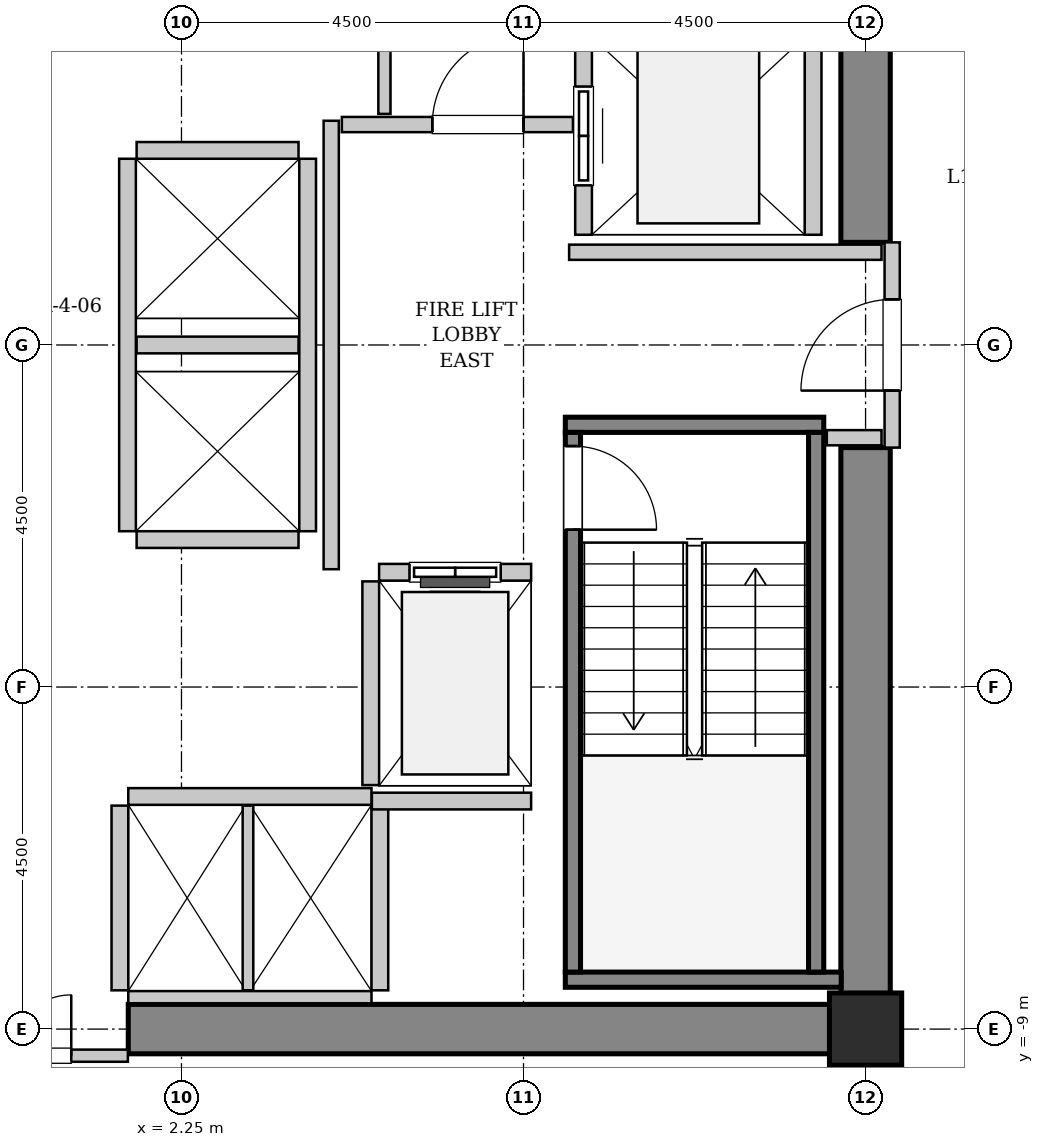
"""IFC4 building model, lengths in metres.
Left out: names, types, materials, properties, quantities, classifications, styles, units other than length and angle.
Written with IfcOpenShell. Run it as: python <this file> out.ifc"""

import sys

from ifc_helpers import new_model, si_unit, direction, frame, frame_2d, origin, origin_2d, place, context, subcontext, project, spatial, rectangle, hollow_rectangle, extrude, source, transform, mapped, element, fill, save


model = new_model("IFC4")
c1 = context("Model", 3, precision=1e-05, world=origin(), true_north=direction((0.0, 1.0)))
c2 = subcontext(c1, "Body", "Model", "MODEL_VIEW")
j1 = project(units=[si_unit("LENGTHUNIT", "METRE"), si_unit("PLANEANGLEUNIT", "RADIAN")], contexts=[c1])
p1 = place(None, origin())
s1 = spatial("IfcSite", under=j1, at=p1, CompositionType="ELEMENT")
p2 = place(p1, origin())
s2 = spatial("IfcBuilding", under=s1, at=p2, CompositionType="ELEMENT")
p3 = place(p2, frame((0.0, 0.0, 82.4)))
s3 = spatial("IfcBuildingStorey", under=s2, at=p3, CompositionType="ELEMENT", Elevation=82.4)
m1 = source(origin(), c2, "Body", "SweptSolid", [
    extrude(rectangle(XDim=10.025, YDim=0.65, at=frame_2d((5.012, 0.0))), origin(), (0.0, 0.0, 1.0), 3.8),
])
p4 = place(p3, frame((1.55, -9.0, 0.0), z_axis=(0.0, 0.0, 1.0), x_axis=(1.0, 0.0, 0.0)))
e1 = element("IfcWall", 1, at=p4, inside=s3, PredefinedType="SHEAR", context=c2, shape_type="MappedRepresentation", body=[
    mapped(m1, transform((0.0, 0.0, 0.0), x_axis=(1.0, 0.0, 0.0), y_axis=(0.0, 1.0, 0.0), z_axis=(0.0, 0.0, 1.0), scale=1.0)),
])
m2 = source(origin(), c2, "Body", "SweptSolid", [
    extrude(rectangle(XDim=7.325, YDim=0.65, at=frame_2d((3.663, 0.0))), origin(), (0.0, 0.0, 1.0), 3.8),
])
for number, where, z_axis, x_axis in (
    (2, (11.25, -8.675, 0.0), (0.0, 0.0, 1.0), (0.0, 1.0, 0.0)),
    (3, (11.25, 1.35, 0.0), (0.0, 0.0, 1.0), (0.0, 1.0, 0.0)),
):
    element("IfcWall", number, at=place(p3, frame(where, z_axis=z_axis, x_axis=x_axis)), inside=s3, PredefinedType="SHEAR", context=c2, shape_type="MappedRepresentation", body=[
        mapped(m2, transform((0.0, 0.0, 0.0), x_axis=(1.0, 0.0, 0.0), y_axis=(0.0, 1.0, 0.0), z_axis=(0.0, 0.0, 1.0), scale=1.0)),
    ])
m3 = source(origin(), c2, "Body", "SweptSolid", [
    extrude(hollow_rectangle(XDim=0.95, YDim=0.95, WallThickness=0.045, InnerFilletRadius=0.045, OuterFilletRadius=0.09, at=origin_2d()), origin(), (0.0, 0.0, 1.0), 3.8),
])
p5 = place(p3, frame((11.25, -9.0, 0.0), z_axis=(0.0, 0.0, 1.0), x_axis=(1.0, 0.0, 0.0)))
e4 = element("IfcColumn", 4, at=p5, inside=s3, PredefinedType="COLUMN", context=c2, shape_type="MappedRepresentation", body=[
    mapped(m3, transform((0.0, 0.0, 0.0), x_axis=(1.0, 0.0, 0.0), y_axis=(0.0, 1.0, 0.0), z_axis=(0.0, 0.0, 1.0), scale=1.0)),
])
m4 = source(origin(), c2, "Body", "SweptSolid", [
    extrude(rectangle(XDim=3.4, YDim=0.2, at=frame_2d((1.7, 0.0))), origin(), (0.0, 0.0, 1.0), 3.8),
])
p6 = place(p3, frame((7.3, -1.05, 0.0), z_axis=(0.0, 0.0, 1.0), x_axis=(1.0, 0.0, 0.0)))
e5 = element("IfcWall", 5, at=p6, inside=s3, PredefinedType="SOLIDWALL", context=c2, shape_type="MappedRepresentation", body=[
    mapped(m4, transform((0.0, 0.0, 0.0), x_axis=(1.0, 0.0, 0.0), y_axis=(0.0, 1.0, 0.0), z_axis=(0.0, 0.0, 1.0), scale=1.0)),
])
m5 = source(origin(), c2, "Body", "SweptSolid", [
    extrude(rectangle(XDim=3.63, YDim=0.2, at=frame_2d((1.815, 0.0))), origin(), (0.0, 0.0, 1.0), 3.8),
])
p7 = place(p3, frame((7.3, -8.35, 0.0), z_axis=(0.0, 0.0, 1.0), x_axis=(1.0, 0.0, 0.0)))
e6 = element("IfcWall", 6, at=p7, inside=s3, PredefinedType="SOLIDWALL", context=c2, shape_type="MappedRepresentation", body=[
    mapped(m5, transform((0.0, 0.0, 0.0), x_axis=(1.0, 0.0, 0.0), y_axis=(0.0, 1.0, 0.0), z_axis=(0.0, 0.0, 1.0), scale=1.0)),
])
m6 = source(origin(), c2, "Body", "SweptSolid", [
    extrude(rectangle(XDim=7.1, YDim=0.2, at=frame_2d((3.55, 0.0))), origin(), (0.0, 0.0, 1.0), 3.8),
])
p8 = place(p3, frame((7.4, -1.15, 0.0), z_axis=(0.0, 0.0, 1.0), x_axis=(0.0, -1.0, 0.0)))
e7 = element("IfcWall", 7, at=p8, inside=s3, PredefinedType="SOLIDWALL", context=c2, shape_type="MappedRepresentation", body=[
    mapped(m6, transform((0.0, 0.0, 0.0), x_axis=(1.0, 0.0, 0.0), y_axis=(0.0, 1.0, 0.0), z_axis=(0.0, 0.0, 1.0), scale=1.0)),
])
p9 = place(p8, frame((0.18, 0.0, 0.0)))
e8 = element("IfcOpeningElement", 8, at=p9, cuts=e7, PredefinedType="OPENING", context=c2, shape_type="SweptSolid", body=[
    extrude(rectangle(XDim=1.1, YDim=2.15, at=frame_2d((0.55, 1.075))), frame((0.0, 0.11, 0.0), z_axis=(0.0, -1.0, 0.0), x_axis=(1.0, 0.0, 0.0)), (0.0, 0.0, 1.0), 0.22),
])
p10 = place(p3, frame((10.6, -1.15, 0.0), z_axis=(0.0, 0.0, 1.0), x_axis=(0.0, -1.0, 0.0)))
e9 = element("IfcWall", 9, at=p10, inside=s3, PredefinedType="SOLIDWALL", context=c2, shape_type="MappedRepresentation", body=[
    mapped(m6, transform((0.0, 0.0, 0.0), x_axis=(1.0, 0.0, 0.0), y_axis=(0.0, 1.0, 0.0), z_axis=(0.0, 0.0, 1.0), scale=1.0)),
])
m7 = source(origin(), c2, "Body", "SweptSolid", [
    extrude(rectangle(XDim=2.0, YDim=0.22, at=frame_2d((1.0, 0.0))), origin(), (0.0, 0.0, 1.0), 3.485),
])
p11 = place(p3, frame((6.85, -2.99, 0.0), z_axis=(0.0, 0.0, 1.0), x_axis=(-1.0, 0.0, 0.0)))
e10 = element("IfcWall", 10, at=p11, inside=s3, PredefinedType="SOLIDWALL", context=c2, shape_type="MappedRepresentation", body=[
    mapped(m7, transform((0.0, 0.0, 0.0), x_axis=(1.0, 0.0, 0.0), y_axis=(0.0, 1.0, 0.0), z_axis=(0.0, 0.0, 1.0), scale=1.0)),
])
p12 = place(p11, frame((0.4, 0.0, 0.0)))
e11 = element("IfcOpeningElement", 11, at=p12, cuts=e10, PredefinedType="OPENING", context=c2, shape_type="SweptSolid", body=[
    extrude(rectangle(XDim=1.2, YDim=2.2, at=frame_2d((0.6, 1.1))), frame((0.0, 0.12, 0.0), z_axis=(0.0, -1.0, 0.0), x_axis=(1.0, 0.0, 0.0)), (0.0, 0.0, 1.0), 0.24),
])
m8 = source(origin(), c2, "Body", "SweptSolid", [
    extrude(rectangle(XDim=2.68, YDim=0.22, at=frame_2d((1.34, 0.0))), origin(), (0.0, 0.0, 1.0), 3.485),
])
p13 = place(p3, frame((4.74, -3.11, 0.0), z_axis=(0.0, 0.0, 1.0), x_axis=(0.0, -1.0, 0.0)))
e12 = element("IfcWall", 12, at=p13, inside=s3, PredefinedType="SOLIDWALL", context=c2, shape_type="MappedRepresentation", body=[
    mapped(m8, transform((0.0, 0.0, 0.0), x_axis=(1.0, 0.0, 0.0), y_axis=(0.0, 1.0, 0.0), z_axis=(0.0, 0.0, 1.0), scale=1.0)),
])
m9 = source(origin(), c2, "Body", "SweptSolid", [
    extrude(rectangle(XDim=5.45, YDim=0.22, at=frame_2d((2.725, 0.0))), origin(), (0.0, 0.0, 1.0), 3.485),
])
p14 = place(p3, frame((7.54, 6.9, 0.0), z_axis=(0.0, 0.0, 1.0), x_axis=(0.0, -1.0, 0.0)))
e13 = element("IfcWall", 13, at=p14, inside=s3, PredefinedType="SOLIDWALL", context=c2, shape_type="MappedRepresentation", body=[
    mapped(m9, transform((0.0, 0.0, 0.0), x_axis=(1.0, 0.0, 0.0), y_axis=(0.0, 1.0, 0.0), z_axis=(0.0, 0.0, 1.0), scale=1.0)),
])
p15 = place(p14, frame((3.5, 0.0, 0.0)))
e14 = element("IfcOpeningElement", 14, at=p15, cuts=e13, PredefinedType="OPENING", context=c2, shape_type="SweptSolid", body=[
    extrude(rectangle(XDim=1.3, YDim=2.3, at=frame_2d((0.65, 1.15))), frame((0.0, 0.12, 0.0), z_axis=(0.0, -1.0, 0.0), x_axis=(1.0, 0.0, 0.0)), (0.0, 0.0, 1.0), 0.24),
])
p16 = place(p14, frame((0.65, 0.0, 0.0)))
e15 = element("IfcOpeningElement", 15, at=p16, cuts=e13, PredefinedType="OPENING", context=c2, shape_type="SweptSolid", body=[
    extrude(rectangle(XDim=1.3, YDim=2.3, at=frame_2d((0.65, 1.15))), frame((0.0, 0.12, 0.0), z_axis=(0.0, -1.0, 0.0), x_axis=(1.0, 0.0, 0.0)), (0.0, 0.0, 1.0), 0.24),
])
p17 = place(p3, frame((10.56, 1.45, 0.0), z_axis=(0.0, 0.0, 1.0), x_axis=(0.0, 1.0, 0.0)))
e16 = element("IfcWall", 16, at=p17, inside=s3, PredefinedType="SOLIDWALL", context=c2, shape_type="MappedRepresentation", body=[
    mapped(m9, transform((0.0, 0.0, 0.0), x_axis=(1.0, 0.0, 0.0), y_axis=(0.0, 1.0, 0.0), z_axis=(0.0, 0.0, 1.0), scale=1.0)),
])
m10 = source(origin(), c2, "Body", "SweptSolid", [
    extrude(rectangle(XDim=3.2, YDim=0.22, at=frame_2d((1.6, 0.0))), origin(), (0.0, 0.0, 1.0), 3.485),
])
p18 = place(p3, frame((4.75, -5.94, 0.0), z_axis=(0.0, 0.0, 1.0), x_axis=(-1.0, 0.0, 0.0)))
e17 = element("IfcWall", 17, at=p18, inside=s3, PredefinedType="SOLIDWALL", context=c2, shape_type="MappedRepresentation", body=[
    mapped(m10, transform((0.0, 0.0, 0.0), x_axis=(1.0, 0.0, 0.0), y_axis=(0.0, 1.0, 0.0), z_axis=(0.0, 0.0, 1.0), scale=1.0)),
])
m11 = source(origin(), c2, "Body", "SweptSolid", [
    extrude(rectangle(XDim=3.2, YDim=0.16, at=frame_2d((1.6, 0.0))), origin(), (0.0, 0.0, 1.0), 2.375),
])
p19 = place(p3, frame((1.55, -8.58, 0.0), z_axis=(0.0, 0.0, 1.0), x_axis=(1.0, 0.0, 0.0)))
e18 = element("IfcWall", 18, at=p19, inside=s3, PredefinedType="PARTITIONING", context=c2, shape_type="MappedRepresentation", body=[
    mapped(m11, transform((0.0, 0.0, 0.0), x_axis=(1.0, 0.0, 0.0), y_axis=(0.0, 1.0, 0.0), z_axis=(0.0, 0.0, 1.0), scale=1.0)),
])
m12 = source(origin(), c2, "Body", "SweptSolid", [
    extrude(rectangle(XDim=2.43, YDim=0.22, at=frame_2d((1.215, 0.0))), origin(), (0.0, 0.0, 1.0), 3.485),
])
p20 = place(p3, frame((1.44, -6.06, 0.0), z_axis=(0.0, 0.0, 1.0), x_axis=(0.0, -1.0, 0.0)))
e19 = element("IfcWall", 19, at=p20, inside=s3, PredefinedType="SOLIDWALL", context=c2, shape_type="MappedRepresentation", body=[
    mapped(m12, transform((0.0, 0.0, 0.0), x_axis=(1.0, 0.0, 0.0), y_axis=(0.0, 1.0, 0.0), z_axis=(0.0, 0.0, 1.0), scale=1.0)),
])
m13 = source(origin(), c2, "Body", "SweptSolid", [
    extrude(rectangle(XDim=2.43, YDim=0.14, at=frame_2d((1.215, 0.0))), origin(), (0.0, 0.0, 1.0), 3.485),
])
p21 = place(p3, frame((3.125, -8.49, 0.0), z_axis=(0.0, 0.0, 1.0), x_axis=(0.0, 1.0, 0.0)))
e20 = element("IfcWall", 20, at=p21, inside=s3, PredefinedType="PARTITIONING", context=c2, shape_type="MappedRepresentation", body=[
    mapped(m13, transform((0.0, 0.0, 0.0), x_axis=(1.0, 0.0, 0.0), y_axis=(0.0, 1.0, 0.0), z_axis=(0.0, 0.0, 1.0), scale=1.0)),
])
p22 = place(p3, frame((4.86, -8.49, 0.0), z_axis=(0.0, 0.0, 1.0), x_axis=(0.0, 1.0, 0.0)))
e21 = element("IfcWall", 21, at=p22, inside=s3, PredefinedType="SOLIDWALL", context=c2, shape_type="MappedRepresentation", body=[
    mapped(m12, transform((0.0, 0.0, 0.0), x_axis=(1.0, 0.0, 0.0), y_axis=(0.0, 1.0, 0.0), z_axis=(0.0, 0.0, 1.0), scale=1.0)),
])
m14 = source(origin(), c2, "Body", "SweptSolid", [
    extrude(rectangle(XDim=4.9, YDim=0.22, at=frame_2d((2.45, 0.0))), origin(), (0.0, 0.0, 1.0), 3.485),
])
for number, where, z_axis, x_axis in (
    (22, (1.54, 2.45, 0.0), (0.0, 0.0, 1.0), (0.0, -1.0, 0.0)),
    (23, (3.91, -2.45, 0.0), (0.0, 0.0, 1.0), (0.0, 1.0, 0.0)),
):
    element("IfcWall", number, at=place(p3, frame(where, z_axis=z_axis, x_axis=x_axis)), inside=s3, PredefinedType="SOLIDWALL", context=c2, shape_type="MappedRepresentation", body=[
        mapped(m14, transform((0.0, 0.0, 0.0), x_axis=(1.0, 0.0, 0.0), y_axis=(0.0, 1.0, 0.0), z_axis=(0.0, 0.0, 1.0), scale=1.0)),
    ])
m15 = source(origin(), c2, "Body", "SweptSolid", [
    extrude(rectangle(XDim=2.13, YDim=0.22, at=frame_2d((1.065, 0.0))), origin(), (0.0, 0.0, 1.0), 3.485),
])
for number, where, z_axis, x_axis in (
    (24, (1.66, -2.56, 0.0), (0.0, 0.0, 1.0), (1.0, 0.0, 0.0)),
    (25, (1.66, 0.0, 0.0), (0.0, 0.0, 1.0), (1.0, 0.0, 0.0)),
    (26, (3.79, 2.56, 0.0), (0.0, 0.0, 1.0), (-1.0, 0.0, 0.0)),
):
    element("IfcWall", number, at=place(p3, frame(where, z_axis=z_axis, x_axis=x_axis)), inside=s3, PredefinedType="SOLIDWALL", context=c2, shape_type="MappedRepresentation", body=[
        mapped(m15, transform((0.0, 0.0, 0.0), x_axis=(1.0, 0.0, 0.0), y_axis=(0.0, 1.0, 0.0), z_axis=(0.0, 0.0, 1.0), scale=1.0)),
    ])
m16 = source(origin(), c2, "Body", "SweptSolid", [
    extrude(rectangle(XDim=2.095, YDim=0.22, at=frame_2d((1.048, 0.0))), origin(), (0.0, 0.0, 1.0), 3.485),
])
p23 = place(p3, frame((4.755, -6.0, 0.0), z_axis=(0.0, 0.0, 1.0), x_axis=(1.0, 0.0, 0.0)))
e27 = element("IfcWall", 27, at=p23, inside=s3, PredefinedType="SOLIDWALL", context=c2, shape_type="MappedRepresentation", body=[
    mapped(m16, transform((0.0, 0.0, 0.0), x_axis=(1.0, 0.0, 0.0), y_axis=(0.0, 1.0, 0.0), z_axis=(0.0, 0.0, 1.0), scale=1.0)),
])
m17 = source(origin(), c2, "Body", "SweptSolid", [
    extrude(rectangle(XDim=2.7, YDim=0.2, at=frame_2d((1.35, 0.0))), origin(), (0.0, 0.0, 1.0), 2.375),
])
p24 = place(p3, frame((11.6, -1.35, 0.0), z_axis=(0.0, 0.0, 1.0), x_axis=(0.0, 1.0, 0.0)))
e28 = element("IfcWall", 28, at=p24, inside=s3, PredefinedType="PARTITIONING", context=c2, shape_type="MappedRepresentation", body=[
    mapped(m17, transform((0.0, 0.0, 0.0), x_axis=(1.0, 0.0, 0.0), y_axis=(0.0, 1.0, 0.0), z_axis=(0.0, 0.0, 1.0), scale=1.0)),
])
p25 = place(p24, frame((0.75, 0.0, 0.0)))
e29 = element("IfcOpeningElement", 29, at=p25, cuts=e28, PredefinedType="OPENING", context=c2, shape_type="SweptSolid", body=[
    extrude(rectangle(XDim=1.2, YDim=2.15, at=frame_2d((0.6, 1.075))), frame((0.0, 0.11, 0.0), z_axis=(0.0, -1.0, 0.0), x_axis=(1.0, 0.0, 0.0)), (0.0, 0.0, 1.0), 0.22),
])
m18 = source(origin(), c2, "Body", "SweptSolid", [
    extrude(rectangle(XDim=5.9, YDim=0.2, at=frame_2d((2.95, 0.0))), origin(), (0.0, 0.0, 1.0), 3.485),
])
p26 = place(p3, frame((4.22, -2.95, 0.0), z_axis=(0.0, 0.0, 1.0), x_axis=(0.0, 1.0, 0.0)))
e30 = element("IfcWall", 30, at=p26, inside=s3, PredefinedType="PARTITIONING", context=c2, shape_type="MappedRepresentation", body=[
    mapped(m18, transform((0.0, 0.0, 0.0), x_axis=(1.0, 0.0, 0.0), y_axis=(0.0, 1.0, 0.0), z_axis=(0.0, 0.0, 1.0), scale=1.0)),
])
m19 = source(origin(), c2, "Body", "SweptSolid", [
    extrude(rectangle(XDim=3.04, YDim=0.2, at=frame_2d((1.52, 0.0))), origin(), (0.0, 0.0, 1.0), 3.485),
])
p27 = place(p3, frame((4.36, 2.9, 0.0), z_axis=(0.0, 0.0, 1.0), x_axis=(1.0, 0.0, 0.0)))
e31 = element("IfcWall", 31, at=p27, inside=s3, PredefinedType="PARTITIONING", context=c2, shape_type="MappedRepresentation", body=[
    mapped(m19, transform((0.0, 0.0, 0.0), x_axis=(1.0, 0.0, 0.0), y_axis=(0.0, 1.0, 0.0), z_axis=(0.0, 0.0, 1.0), scale=1.0)),
])
p28 = place(p27, frame((1.19, 0.0, 0.0)))
e32 = element("IfcOpeningElement", 32, at=p28, cuts=e31, PredefinedType="OPENING", context=c2, shape_type="SweptSolid", body=[
    extrude(rectangle(XDim=1.2, YDim=2.15, at=frame_2d((0.6, 1.075))), frame((0.0, 0.11, 0.0), z_axis=(0.0, -1.0, 0.0), x_axis=(1.0, 0.0, 0.0)), (0.0, 0.0, 1.0), 0.22),
])
m20 = source(origin(), c2, "Body", "SweptSolid", [
    extrude(rectangle(XDim=4.11, YDim=0.2, at=frame_2d((2.055, 0.0))), origin(), (0.0, 0.0, 1.0), 3.485),
])
p29 = place(p3, frame((7.35, 1.22, 0.0), z_axis=(0.0, 0.0, 1.0), x_axis=(1.0, 0.0, 0.0)))
e33 = element("IfcWall", 33, at=p29, inside=s3, PredefinedType="PARTITIONING", context=c2, shape_type="MappedRepresentation", body=[
    mapped(m20, transform((0.0, 0.0, 0.0), x_axis=(1.0, 0.0, 0.0), y_axis=(0.0, 1.0, 0.0), z_axis=(0.0, 0.0, 1.0), scale=1.0)),
])
m21 = source(origin(), c2, "Body", "SweptSolid", [
    extrude(rectangle(XDim=0.72, YDim=0.2, at=frame_2d((0.36, 0.0))), origin(), (0.0, 0.0, 1.0), 3.485),
])
p30 = place(p3, frame((10.74, -1.22, 0.0), z_axis=(0.0, 0.0, 1.0), x_axis=(1.0, 0.0, 0.0)))
e34 = element("IfcWall", 34, at=p30, inside=s3, PredefinedType="PARTITIONING", context=c2, shape_type="MappedRepresentation", body=[
    mapped(m21, transform((0.0, 0.0, 0.0), x_axis=(1.0, 0.0, 0.0), y_axis=(0.0, 1.0, 0.0), z_axis=(0.0, 0.0, 1.0), scale=1.0)),
])
m22 = source(origin(), c2, "Body", "SweptSolid", [
    extrude(rectangle(XDim=3.09, YDim=0.16, at=frame_2d((1.545, 0.0))), origin(), (0.0, 0.0, 1.0), 2.375),
])
p31 = place(p3, frame((-1.545, -9.35, 0.0), z_axis=(0.0, 0.0, 1.0), x_axis=(1.0, 0.0, 0.0)))
e35 = element("IfcWall", 35, at=p31, inside=s3, PredefinedType="PARTITIONING", context=c2, shape_type="MappedRepresentation", body=[
    mapped(m22, transform((0.0, 0.0, 0.0), x_axis=(1.0, 0.0, 0.0), y_axis=(0.0, 1.0, 0.0), z_axis=(0.0, 0.0, 1.0), scale=1.0)),
])
p32 = place(p31, frame((0.745, 0.0, 0.0)))
e36 = element("IfcOpeningElement", 36, at=p32, cuts=e35, PredefinedType="OPENING", context=c2, shape_type="SweptSolid", body=[
    extrude(rectangle(XDim=1.6, YDim=2.3, at=frame_2d((0.8, 1.15))), frame((0.0, 0.09, 0.0), z_axis=(0.0, -1.0, 0.0), x_axis=(1.0, 0.0, 0.0)), (0.0, 0.0, 1.0), 0.18),
])
m23 = source(origin(), c2, "Body", "SweptSolid", [
    extrude(rectangle(XDim=3.015, YDim=0.16, at=frame_2d((1.507, 0.0))), origin(), (0.0, 0.0, 1.0), 3.485),
])
p33 = place(p3, frame((4.92, 3.04, 0.0), z_axis=(0.0, 0.0, 1.0), x_axis=(0.0, 1.0, 0.0)))
e37 = element("IfcWall", 37, at=p33, inside=s3, PredefinedType="PARTITIONING", context=c2, shape_type="MappedRepresentation", body=[
    mapped(m23, transform((0.0, 0.0, 0.0), x_axis=(1.0, 0.0, 0.0), y_axis=(0.0, 1.0, 0.0), z_axis=(0.0, 0.0, 1.0), scale=1.0)),
])
m24 = source(origin(), c2, "Body", "SweptSolid", [
    extrude(rectangle(XDim=1.1, YDim=2.15, at=frame_2d((0.55, 1.075))), frame((0.0, 0.025, 0.0), z_axis=(0.0, -1.0, 0.0), x_axis=(1.0, 0.0, 0.0)), (0.0, 0.0, 1.0), 0.05),
])
p34 = place(p9, origin())
e38 = element("IfcDoor", 38, at=p34, inside=s3, OperationType="SINGLE_SWING_RIGHT", PredefinedType="DOOR", context=c2, shape_type="MappedRepresentation", body=[
    mapped(m24, transform((0.0, 0.0, 0.0), x_axis=(1.0, 0.0, 0.0), y_axis=(0.0, 1.0, 0.0), z_axis=(0.0, 0.0, 1.0), scale=1.0)),
])
fill(e8, e38)
m25 = source(origin(), c2, "Body", "SweptSolid", [
    extrude(rectangle(XDim=1.2, YDim=2.2, at=frame_2d((0.6, 1.1))), frame((0.0, 0.025, 0.0), z_axis=(0.0, -1.0, 0.0), x_axis=(1.0, 0.0, 0.0)), (0.0, 0.0, 1.0), 0.05),
])
p35 = place(p12, origin())
e39 = element("IfcDoor", 39, at=p35, inside=s3, OperationType="SLIDING_TO_LEFT", PredefinedType="DOOR", context=c2, shape_type="MappedRepresentation", body=[
    mapped(m25, transform((0.0, 0.0, 0.0), x_axis=(1.0, 0.0, 0.0), y_axis=(0.0, 1.0, 0.0), z_axis=(0.0, 0.0, 1.0), scale=1.0)),
])
fill(e11, e39)
m26 = source(origin(), c2, "Body", "SweptSolid", [
    extrude(rectangle(XDim=1.3, YDim=2.3, at=frame_2d((0.65, 1.15))), frame((0.0, 0.025, 0.0), z_axis=(0.0, -1.0, 0.0), x_axis=(1.0, 0.0, 0.0)), (0.0, 0.0, 1.0), 0.05),
])
p36 = place(p15, origin())
e40 = element("IfcDoor", 40, at=p36, inside=s3, OperationType="SLIDING_TO_RIGHT", PredefinedType="DOOR", context=c2, shape_type="MappedRepresentation", body=[
    mapped(m26, transform((0.0, 0.0, 0.0), x_axis=(1.0, 0.0, 0.0), y_axis=(0.0, 1.0, 0.0), z_axis=(0.0, 0.0, 1.0), scale=1.0)),
])
fill(e14, e40)
m27 = source(origin(), c2, "Body", "SweptSolid", [
    extrude(rectangle(XDim=1.2, YDim=2.15, at=frame_2d((0.6, 1.075))), frame((0.0, 0.025, 0.0), z_axis=(0.0, -1.0, 0.0), x_axis=(1.0, 0.0, 0.0)), (0.0, 0.0, 1.0), 0.05),
])
p37 = place(p25, origin())
e41 = element("IfcDoor", 41, at=p37, inside=s3, OperationType="SINGLE_SWING_LEFT", PredefinedType="DOOR", context=c2, shape_type="MappedRepresentation", body=[
    mapped(m27, transform((0.0, 0.0, 0.0), x_axis=(1.0, 0.0, 0.0), y_axis=(0.0, 1.0, 0.0), z_axis=(0.0, 0.0, 1.0), scale=1.0)),
])
fill(e29, e41)
p38 = place(p28, origin())
e42 = element("IfcDoor", 42, at=p38, inside=s3, OperationType="SINGLE_SWING_RIGHT", PredefinedType="DOOR", context=c2, shape_type="MappedRepresentation", body=[
    mapped(m27, transform((0.0, 0.0, 0.0), x_axis=(1.0, 0.0, 0.0), y_axis=(0.0, 1.0, 0.0), z_axis=(0.0, 0.0, 1.0), scale=1.0)),
])
fill(e32, e42)
m28 = source(origin(), c2, "Body", "SweptSolid", [
    extrude(rectangle(XDim=1.6, YDim=2.3, at=frame_2d((0.8, 1.15))), frame((0.0, 0.025, 0.0), z_axis=(0.0, -1.0, 0.0), x_axis=(1.0, 0.0, 0.0)), (0.0, 0.0, 1.0), 0.05),
])
p39 = place(p32, origin())
e43 = element("IfcDoor", 43, at=p39, inside=s3, OperationType="DOUBLE_DOOR_SINGLE_SWING", PredefinedType="DOOR", context=c2, shape_type="MappedRepresentation", body=[
    mapped(m28, transform((0.0, 0.0, 0.0), x_axis=(1.0, 0.0, 0.0), y_axis=(0.0, 1.0, 0.0), z_axis=(0.0, 0.0, 1.0), scale=1.0)),
])
fill(e36, e43)
save(model, sys.argv[1])
